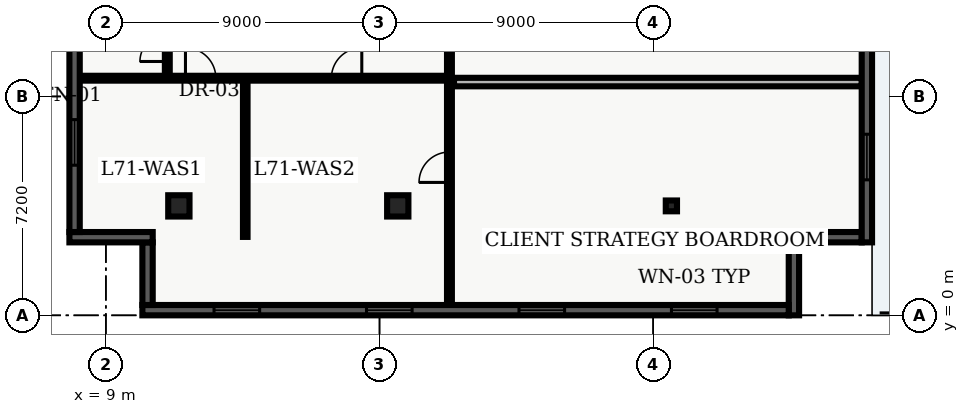
"""IFC4 building model, lengths in metres.
Left out: names, types, materials, properties, quantities, classifications, styles, units other than length and angle.
Written with IfcOpenShell. Run it as: python <this file> out.ifc"""

import sys

from ifc_helpers import new_model, entity, si_unit, converted_unit, direction, frame, origin_with_axes, origin_2d_with_axis, place, context, subcontext, project, spatial, polyline, rectangle, i_section, outline, extrude, element, fill, save


model = new_model("IFC4")
c1 = context("Model", 3, precision=1e-05, world=origin_with_axes(), true_north=direction((0.0, 1.0)))
c2 = subcontext(c1, "Body", "Model", "MODEL_VIEW")
j1 = project(units=[si_unit("LENGTHUNIT", "METRE"), converted_unit("PLANEANGLEUNIT", "DEGREE", entity("IfcPlaneAngleMeasure", 0.017), si_unit("PLANEANGLEUNIT", "RADIAN"), dimensions=[0, 0, 0, 0, 0, 0, 0])], contexts=[c1])
p1 = place(None, origin_with_axes())
s1 = spatial("IfcSite", under=j1, at=p1, CompositionType="ELEMENT")
p2 = place(p1, origin_with_axes())
s2 = spatial("IfcBuilding", under=s1, at=p2, CompositionType="ELEMENT")
p3 = place(p2, frame((0.0, 0.0, 288.0), z_axis=(0.0, 0.0, 1.0), x_axis=(1.0, 0.0, 0.0)))
s3 = spatial("IfcBuildingStorey", under=s2, at=p3, CompositionType="ELEMENT", Elevation=288.0)
for number, where, z_axis, x_axis in (
    (1, (11.4, 3.6, 0.0), (0.0, 0.0, 1.0), (1.0, 0.0, 0.0)),
    (2, (18.6, 3.6, 0.0), (0.0, 0.0, 1.0), (1.0, 0.0, 0.0)),
):
    element("IfcColumn", number, at=place(p3, frame(where, z_axis=z_axis, x_axis=x_axis)), inside=s3, PredefinedType="COLUMN", context=c2, shape_type="SweptSolid", body=[
        extrude(rectangle(XDim=0.7, YDim=0.7, at=origin_2d_with_axis()), origin_with_axes(), (0.0, 0.0, 1.0), 3.9),
    ])
p4 = place(p3, frame((27.6, 3.6, 0.0), z_axis=(0.0, 0.0, 1.0), x_axis=(1.0, 0.0, 0.0)))
e3 = element("IfcColumn", 3, at=p4, inside=s3, PredefinedType="COLUMN", context=c2, shape_type="SweptSolid", body=[
    extrude(i_section(OverallWidth=0.369, OverallDepth=0.356, WebThickness=0.011, FlangeThickness=0.018, FilletRadius=0.018, at=origin_2d_with_axis()), origin_with_axes(), (0.0, 0.0, 1.0), 3.9),
])
p5 = place(p3, frame((8.135, 7.8, 0.0), z_axis=(0.0, 0.0, 1.0), x_axis=(1.0, 0.0, 0.0)))
e4 = element("IfcWall", 4, at=p5, inside=s3, PredefinedType="PARTITIONING", context=c2, shape_type="SweptSolid", body=[
    extrude(outline(polyline([(0.0, -0.08), (12.165, -0.08), (12.165, 0.08), (0.0, 0.08), (0.0, -0.08)])), origin_with_axes(), (0.0, 0.0, 1.0), 2.7),
])
p6 = place(p5, frame((3.982, 0.0, 0.0), z_axis=(0.0, 0.0, 1.0), x_axis=(1.0, 0.0, 0.0)))
e5 = element("IfcOpeningElement", 5, at=p6, cuts=e4, PredefinedType="OPENING", context=c2, shape_type="SweptSolid", body=[
    extrude(rectangle(XDim=1.0, YDim=0.18, at=origin_2d_with_axis()), origin_with_axes(), (0.0, 0.0, 1.0), 2.15),
])
p7 = place(p5, frame((8.782, 0.0, 0.0), z_axis=(0.0, 0.0, 1.0), x_axis=(1.0, 0.0, 0.0)))
e6 = element("IfcOpeningElement", 6, at=p7, cuts=e4, PredefinedType="OPENING", context=c2, shape_type="SweptSolid", body=[
    extrude(rectangle(XDim=1.0, YDim=0.18, at=origin_2d_with_axis()), origin_with_axes(), (0.0, 0.0, 1.0), 2.15),
])
p8 = place(p3, frame((20.3, 0.335, 0.0), z_axis=(0.0, 0.0, 1.0), x_axis=(0.0, 1.0, 0.0)))
e7 = element("IfcWall", 7, at=p8, inside=s3, PredefinedType="PARTITIONING", context=c2, shape_type="SweptSolid", body=[
    extrude(outline(polyline([(0.0, -0.08), (40.165, -0.08), (40.165, 0.08), (0.0, 0.08), (0.0, -0.08)])), origin_with_axes(), (0.0, 0.0, 1.0), 2.7),
])
p9 = place(p8, frame((32.49, 0.0, 0.0), z_axis=(0.0, 0.0, 1.0), x_axis=(1.0, 0.0, 0.0)))
e8 = element("IfcOpeningElement", 8, at=p9, cuts=e7, PredefinedType="OPENING", context=c2, shape_type="SweptSolid", body=[
    extrude(rectangle(XDim=1.05, YDim=0.18, at=origin_2d_with_axis()), origin_with_axes(), (0.0, 0.0, 1.0), 2.15),
])
p10 = place(p8, frame((4.537, 0.0, 0.0), z_axis=(0.0, 0.0, 1.0), x_axis=(1.0, 0.0, 0.0)))
e9 = element("IfcOpeningElement", 9, at=p10, cuts=e7, PredefinedType="OPENING", context=c2, shape_type="SweptSolid", body=[
    extrude(rectangle(XDim=1.0, YDim=0.18, at=origin_2d_with_axis()), origin_with_axes(), (0.0, 0.0, 1.0), 2.15),
])
p11 = place(p8, frame((11.911, 0.0, 0.0), z_axis=(0.0, 0.0, 1.0), x_axis=(1.0, 0.0, 0.0)))
e10 = element("IfcOpeningElement", 10, at=p11, cuts=e7, PredefinedType="OPENING", context=c2, shape_type="SweptSolid", body=[
    extrude(rectangle(XDim=1.0, YDim=0.18, at=origin_2d_with_axis()), origin_with_axes(), (0.0, 0.0, 1.0), 2.15),
])
p12 = place(p8, frame((21.874, 0.0, 0.0), z_axis=(0.0, 0.0, 1.0), x_axis=(1.0, 0.0, 0.0)))
e11 = element("IfcOpeningElement", 11, at=p12, cuts=e7, PredefinedType="OPENING", context=c2, shape_type="SweptSolid", body=[
    extrude(rectangle(XDim=1.0, YDim=0.18, at=origin_2d_with_axis()), origin_with_axes(), (0.0, 0.0, 1.0), 2.15),
])
p13 = place(p3, frame((11.02, 7.8, 0.0), z_axis=(0.0, 0.0, 1.0), x_axis=(0.0, 1.0, 0.0)))
e12 = element("IfcWall", 12, at=p13, inside=s3, PredefinedType="PARTITIONING", context=c2, shape_type="SweptSolid", body=[
    extrude(outline(polyline([(0.0, -0.08), (2.85, -0.08), (2.85, 0.08), (0.0, 0.08), (0.0, -0.08)])), origin_with_axes(), (0.0, 0.0, 1.0), 2.7),
])
p14 = place(p13, frame((1.0, 0.0, 0.0), z_axis=(0.0, 0.0, 1.0), x_axis=(1.0, 0.0, 0.0)))
e13 = element("IfcOpeningElement", 13, at=p14, cuts=e12, PredefinedType="OPENING", context=c2, shape_type="SweptSolid", body=[
    extrude(rectangle(XDim=0.9, YDim=0.18, at=origin_2d_with_axis()), origin_with_axes(), (0.0, 0.0, 1.0), 2.15),
])
p15 = place(p3, frame((13.584, 2.58, 0.0), z_axis=(0.0, 0.0, 1.0), x_axis=(0.0, 1.0, 0.0)))
e14 = element("IfcWall", 14, at=p15, inside=s3, PredefinedType="PARTITIONING", context=c2, shape_type="SweptSolid", body=[
    extrude(outline(polyline([(0.0, -0.075), (5.12, -0.075), (5.12, 0.075), (0.0, 0.075), (0.0, -0.075)])), origin_with_axes(), (0.0, 0.0, 1.0), 2.7),
])
p16 = place(p3, frame((20.45, 7.673, 0.0), z_axis=(0.0, 0.0, 1.0), x_axis=(1.0, 0.0, 0.0)))
e15 = element("IfcWall", 15, at=p16, inside=s3, PredefinedType="PARTITIONING", context=c2, shape_type="SweptSolid", body=[
    extrude(outline(polyline([(0.0, -0.14), (13.415, -0.14), (13.415, 0.14), (0.0, 0.14), (0.0, -0.14)])), origin_with_axes(), (0.0, 0.0, 1.0), 2.7),
])
p17 = place(p3, frame((33.86, 2.57, 0.0), z_axis=(0.0, 0.0, 1.0), x_axis=(-1.0, 0.0, 0.0)))
e16 = element("IfcWall", 16, at=p17, inside=s3, PredefinedType="SOLIDWALL", context=c2, shape_type="SweptSolid", body=[
    extrude(outline(polyline([(0.0, -0.17), (2.06, -0.17), (2.06, 0.17), (0.0, 0.17), (0.0, -0.17)])), origin_with_axes(), (0.0, 0.0, 1.0), 3.66),
])
p18 = place(p3, frame((31.63, 2.74, 0.0), z_axis=(0.0, 0.0, 1.0), x_axis=(0.0, -1.0, 0.0)))
e17 = element("IfcWall", 17, at=p18, inside=s3, PredefinedType="SOLIDWALL", context=c2, shape_type="SweptSolid", body=[
    extrude(outline(polyline([(0.0, -0.17), (2.74, -0.17), (2.74, 0.17), (0.0, 0.17), (0.0, -0.17)])), origin_with_axes(), (0.0, 0.0, 1.0), 3.66),
])
p19 = place(p3, frame((31.46, 0.17, 0.0), z_axis=(0.0, 0.0, 1.0), x_axis=(-1.0, 0.0, 0.0)))
e18 = element("IfcWall", 18, at=p19, inside=s3, PredefinedType="SOLIDWALL", context=c2, shape_type="SweptSolid", body=[
    extrude(outline(polyline([(0.0, -0.17), (21.26, -0.17), (21.26, 0.17), (0.0, 0.17), (0.0, -0.17)])), origin_with_axes(), (0.0, 0.0, 1.0), 3.66),
])
p20 = place(p19, frame((3.108, 0.0, 0.45), z_axis=(0.0, 0.0, 1.0), x_axis=(1.0, 0.0, 0.0)))
e19 = element("IfcOpeningElement", 19, at=p20, cuts=e18, PredefinedType="OPENING", context=c2, shape_type="SweptSolid", body=[
    extrude(rectangle(XDim=1.5, YDim=0.36, at=origin_2d_with_axis()), origin_with_axes(), (0.0, 0.0, 1.0), 2.1),
])
p21 = place(p19, frame((8.123, 0.0, 0.45), z_axis=(0.0, 0.0, 1.0), x_axis=(1.0, 0.0, 0.0)))
e20 = element("IfcOpeningElement", 20, at=p21, cuts=e18, PredefinedType="OPENING", context=c2, shape_type="SweptSolid", body=[
    extrude(rectangle(XDim=1.5, YDim=0.36, at=origin_2d_with_axis()), origin_with_axes(), (0.0, 0.0, 1.0), 2.1),
])
p22 = place(p19, frame((13.138, 0.0, 0.45), z_axis=(0.0, 0.0, 1.0), x_axis=(1.0, 0.0, 0.0)))
e21 = element("IfcOpeningElement", 21, at=p22, cuts=e18, PredefinedType="OPENING", context=c2, shape_type="SweptSolid", body=[
    extrude(rectangle(XDim=1.5, YDim=0.36, at=origin_2d_with_axis()), origin_with_axes(), (0.0, 0.0, 1.0), 2.1),
])
p23 = place(p19, frame((18.153, 0.0, 0.45), z_axis=(0.0, 0.0, 1.0), x_axis=(1.0, 0.0, 0.0)))
e22 = element("IfcOpeningElement", 22, at=p23, cuts=e18, PredefinedType="OPENING", context=c2, shape_type="SweptSolid", body=[
    extrude(rectangle(XDim=1.5, YDim=0.36, at=origin_2d_with_axis()), origin_with_axes(), (0.0, 0.0, 1.0), 2.1),
])
p24 = place(p3, frame((10.37, 0.34, 0.0), z_axis=(0.0, 0.0, 1.0), x_axis=(0.0, 1.0, 0.0)))
e23 = element("IfcWall", 23, at=p24, inside=s3, PredefinedType="SOLIDWALL", context=c2, shape_type="SweptSolid", body=[
    extrude(outline(polyline([(0.0, -0.17), (2.06, -0.17), (2.06, 0.17), (0.0, 0.17), (0.0, -0.17)])), origin_with_axes(), (0.0, 0.0, 1.0), 3.66),
])
p25 = place(p3, frame((10.54, 2.57, 0.0), z_axis=(0.0, 0.0, 1.0), x_axis=(-1.0, 0.0, 0.0)))
e24 = element("IfcWall", 24, at=p25, inside=s3, PredefinedType="SOLIDWALL", context=c2, shape_type="SweptSolid", body=[
    extrude(outline(polyline([(0.0, -0.17), (2.74, -0.17), (2.74, 0.17), (0.0, 0.17), (0.0, -0.17)])), origin_with_axes(), (0.0, 0.0, 1.0), 3.66),
])
p26 = place(p3, frame((7.97, 2.74, 0.0), z_axis=(0.0, 0.0, 1.0), x_axis=(0.0, 1.0, 0.0)))
e25 = element("IfcWall", 25, at=p26, inside=s3, PredefinedType="SOLIDWALL", context=c2, shape_type="SweptSolid", body=[
    extrude(outline(polyline([(0.0, -0.17), (43.46, -0.17), (43.46, 0.17), (0.0, 0.17), (0.0, -0.17)])), origin_with_axes(), (0.0, 0.0, 1.0), 3.66),
])
p27 = place(p26, frame((2.948, 0.0, 0.45), z_axis=(0.0, 0.0, 1.0), x_axis=(1.0, 0.0, 0.0)))
e26 = element("IfcOpeningElement", 26, at=p27, cuts=e25, PredefinedType="OPENING", context=c2, shape_type="SweptSolid", body=[
    extrude(rectangle(XDim=1.5, YDim=0.36, at=origin_2d_with_axis()), origin_with_axes(), (0.0, 0.0, 1.0), 2.1),
])
p28 = place(p26, frame((7.643, 0.0, 0.45), z_axis=(0.0, 0.0, 1.0), x_axis=(1.0, 0.0, 0.0)))
e27 = element("IfcOpeningElement", 27, at=p28, cuts=e25, PredefinedType="OPENING", context=c2, shape_type="SweptSolid", body=[
    extrude(rectangle(XDim=1.5, YDim=0.36, at=origin_2d_with_axis()), origin_with_axes(), (0.0, 0.0, 1.0), 2.1),
])
p29 = place(p26, frame((12.339, 0.0, 0.45), z_axis=(0.0, 0.0, 1.0), x_axis=(1.0, 0.0, 0.0)))
e28 = element("IfcOpeningElement", 28, at=p29, cuts=e25, PredefinedType="OPENING", context=c2, shape_type="SweptSolid", body=[
    extrude(rectangle(XDim=1.5, YDim=0.36, at=origin_2d_with_axis()), origin_with_axes(), (0.0, 0.0, 1.0), 2.1),
])
p30 = place(p26, frame((21.73, 0.0, 0.45), z_axis=(0.0, 0.0, 1.0), x_axis=(1.0, 0.0, 0.0)))
e29 = element("IfcOpeningElement", 29, at=p30, cuts=e25, PredefinedType="OPENING", context=c2, shape_type="SweptSolid", body=[
    extrude(rectangle(XDim=1.5, YDim=0.36, at=origin_2d_with_axis()), origin_with_axes(), (0.0, 0.0, 1.0), 2.1),
])
p31 = place(p26, frame((31.121, 0.0, 0.45), z_axis=(0.0, 0.0, 1.0), x_axis=(1.0, 0.0, 0.0)))
e30 = element("IfcOpeningElement", 30, at=p31, cuts=e25, PredefinedType="OPENING", context=c2, shape_type="SweptSolid", body=[
    extrude(rectangle(XDim=1.5, YDim=0.36, at=origin_2d_with_axis()), origin_with_axes(), (0.0, 0.0, 1.0), 2.1),
])
p32 = place(p26, frame((35.817, 0.0, 0.45), z_axis=(0.0, 0.0, 1.0), x_axis=(1.0, 0.0, 0.0)))
e31 = element("IfcOpeningElement", 31, at=p32, cuts=e25, PredefinedType="OPENING", context=c2, shape_type="SweptSolid", body=[
    extrude(rectangle(XDim=1.5, YDim=0.36, at=origin_2d_with_axis()), origin_with_axes(), (0.0, 0.0, 1.0), 2.1),
])
p33 = place(p26, frame((40.512, 0.0, 0.45), z_axis=(0.0, 0.0, 1.0), x_axis=(1.0, 0.0, 0.0)))
e32 = element("IfcOpeningElement", 32, at=p33, cuts=e25, PredefinedType="OPENING", context=c2, shape_type="SweptSolid", body=[
    extrude(rectangle(XDim=1.5, YDim=0.36, at=origin_2d_with_axis()), origin_with_axes(), (0.0, 0.0, 1.0), 2.1),
])
p34 = place(p3, frame((34.03, 21.26, 0.0), z_axis=(0.0, 0.0, 1.0), x_axis=(0.0, -1.0, 0.0)))
e33 = element("IfcWall", 33, at=p34, inside=s3, PredefinedType="SOLIDWALL", context=c2, shape_type="SweptSolid", body=[
    extrude(outline(polyline([(0.0, -0.17), (18.86, -0.17), (18.86, 0.17), (0.0, 0.17), (0.0, -0.17)])), origin_with_axes(), (0.0, 0.0, 1.0), 3.66),
])
p35 = place(p34, frame((6.86, 0.0, 0.0), z_axis=(0.0, 0.0, 1.0), x_axis=(1.0, 0.0, 0.0)))
e34 = element("IfcOpeningElement", 34, at=p35, cuts=e33, PredefinedType="OPENING", context=c2, shape_type="SweptSolid", body=[
    extrude(rectangle(XDim=1.6, YDim=0.36, at=origin_2d_with_axis()), origin_with_axes(), (0.0, 0.0, 1.0), 2.2),
])
p36 = place(p34, frame((2.808, 0.0, 0.45), z_axis=(0.0, 0.0, 1.0), x_axis=(1.0, 0.0, 0.0)))
e35 = element("IfcOpeningElement", 35, at=p36, cuts=e33, PredefinedType="OPENING", context=c2, shape_type="SweptSolid", body=[
    extrude(rectangle(XDim=1.5, YDim=0.36, at=origin_2d_with_axis()), origin_with_axes(), (0.0, 0.0, 1.0), 2.1),
])
p37 = place(p34, frame((11.638, 0.0, 0.45), z_axis=(0.0, 0.0, 1.0), x_axis=(1.0, 0.0, 0.0)))
e36 = element("IfcOpeningElement", 36, at=p37, cuts=e33, PredefinedType="OPENING", context=c2, shape_type="SweptSolid", body=[
    extrude(rectangle(XDim=1.5, YDim=0.36, at=origin_2d_with_axis()), origin_with_axes(), (0.0, 0.0, 1.0), 2.1),
])
p38 = place(p34, frame((16.053, 0.0, 0.45), z_axis=(0.0, 0.0, 1.0), x_axis=(1.0, 0.0, 0.0)))
e37 = element("IfcOpeningElement", 37, at=p38, cuts=e33, PredefinedType="OPENING", context=c2, shape_type="SweptSolid", body=[
    extrude(rectangle(XDim=1.5, YDim=0.36, at=origin_2d_with_axis()), origin_with_axes(), (0.0, 0.0, 1.0), 2.1),
])
p39 = place(p13, frame((1.0, 0.0, 0.0), z_axis=(0.0, 0.0, 1.0), x_axis=(1.0, 0.0, 0.0)))
e38 = element("IfcDoor", 38, at=p39, inside=s3, OperationType="SINGLE_SWING_LEFT", PredefinedType="DOOR", context=c2, shape_type="SweptSolid", body=[
    extrude(rectangle(XDim=0.9, YDim=0.09, at=origin_2d_with_axis()), origin_with_axes(), (0.0, 0.0, 1.0), 2.15),
])
fill(e13, e38)
p40 = place(p5, frame((3.982, 0.0, 0.0), z_axis=(0.0, 0.0, 1.0), x_axis=(1.0, 0.0, 0.0)))
e39 = element("IfcDoor", 39, at=p40, inside=s3, OperationType="SINGLE_SWING_LEFT", PredefinedType="DOOR", context=c2, shape_type="SweptSolid", body=[
    extrude(rectangle(XDim=1.0, YDim=0.09, at=origin_2d_with_axis()), origin_with_axes(), (0.0, 0.0, 1.0), 2.15),
])
fill(e5, e39)
p41 = place(p5, frame((8.782, 0.0, 0.0), z_axis=(0.0, 0.0, 1.0), x_axis=(1.0, 0.0, 0.0)))
e40 = element("IfcDoor", 40, at=p41, inside=s3, OperationType="SINGLE_SWING_RIGHT", PredefinedType="DOOR", context=c2, shape_type="SweptSolid", body=[
    extrude(rectangle(XDim=1.0, YDim=0.09, at=origin_2d_with_axis()), origin_with_axes(), (0.0, 0.0, 1.0), 2.15),
])
fill(e6, e40)
p42 = place(p8, frame((4.537, 0.0, 0.0), z_axis=(0.0, 0.0, 1.0), x_axis=(1.0, 0.0, 0.0)))
e41 = element("IfcDoor", 41, at=p42, inside=s3, OperationType="SINGLE_SWING_LEFT", PredefinedType="DOOR", context=c2, shape_type="SweptSolid", body=[
    extrude(rectangle(XDim=1.0, YDim=0.09, at=origin_2d_with_axis()), origin_with_axes(), (0.0, 0.0, 1.0), 2.15),
])
fill(e9, e41)
p43 = place(p19, frame((3.108, 0.0, 0.45), z_axis=(0.0, 0.0, 1.0), x_axis=(1.0, 0.0, 0.0)))
e42 = element("IfcWindow", 42, at=p43, inside=s3, PredefinedType="WINDOW", context=c2, shape_type="SweptSolid", body=[
    extrude(rectangle(XDim=1.5, YDim=0.09, at=origin_2d_with_axis()), origin_with_axes(), (0.0, 0.0, 1.0), 2.1),
])
fill(e19, e42)
p44 = place(p19, frame((8.123, 0.0, 0.45), z_axis=(0.0, 0.0, 1.0), x_axis=(1.0, 0.0, 0.0)))
e43 = element("IfcWindow", 43, at=p44, inside=s3, PredefinedType="WINDOW", context=c2, shape_type="SweptSolid", body=[
    extrude(rectangle(XDim=1.5, YDim=0.09, at=origin_2d_with_axis()), origin_with_axes(), (0.0, 0.0, 1.0), 2.1),
])
fill(e20, e43)
p45 = place(p19, frame((13.138, 0.0, 0.45), z_axis=(0.0, 0.0, 1.0), x_axis=(1.0, 0.0, 0.0)))
e44 = element("IfcWindow", 44, at=p45, inside=s3, PredefinedType="WINDOW", context=c2, shape_type="SweptSolid", body=[
    extrude(rectangle(XDim=1.5, YDim=0.09, at=origin_2d_with_axis()), origin_with_axes(), (0.0, 0.0, 1.0), 2.1),
])
fill(e21, e44)
p46 = place(p19, frame((18.153, 0.0, 0.45), z_axis=(0.0, 0.0, 1.0), x_axis=(1.0, 0.0, 0.0)))
e45 = element("IfcWindow", 45, at=p46, inside=s3, PredefinedType="WINDOW", context=c2, shape_type="SweptSolid", body=[
    extrude(rectangle(XDim=1.5, YDim=0.09, at=origin_2d_with_axis()), origin_with_axes(), (0.0, 0.0, 1.0), 2.1),
])
fill(e22, e45)
p47 = place(p26, frame((2.948, 0.0, 0.45), z_axis=(0.0, 0.0, 1.0), x_axis=(1.0, 0.0, 0.0)))
e46 = element("IfcWindow", 46, at=p47, inside=s3, PredefinedType="WINDOW", context=c2, shape_type="SweptSolid", body=[
    extrude(rectangle(XDim=1.5, YDim=0.09, at=origin_2d_with_axis()), origin_with_axes(), (0.0, 0.0, 1.0), 2.1),
])
fill(e26, e46)
p48 = place(p34, frame((16.053, 0.0, 0.45), z_axis=(0.0, 0.0, 1.0), x_axis=(1.0, 0.0, 0.0)))
e47 = element("IfcWindow", 47, at=p48, inside=s3, PredefinedType="WINDOW", context=c2, shape_type="SweptSolid", body=[
    extrude(rectangle(XDim=1.5, YDim=0.09, at=origin_2d_with_axis()), origin_with_axes(), (0.0, 0.0, 1.0), 2.1),
])
fill(e37, e47)
save(model, sys.argv[1])
